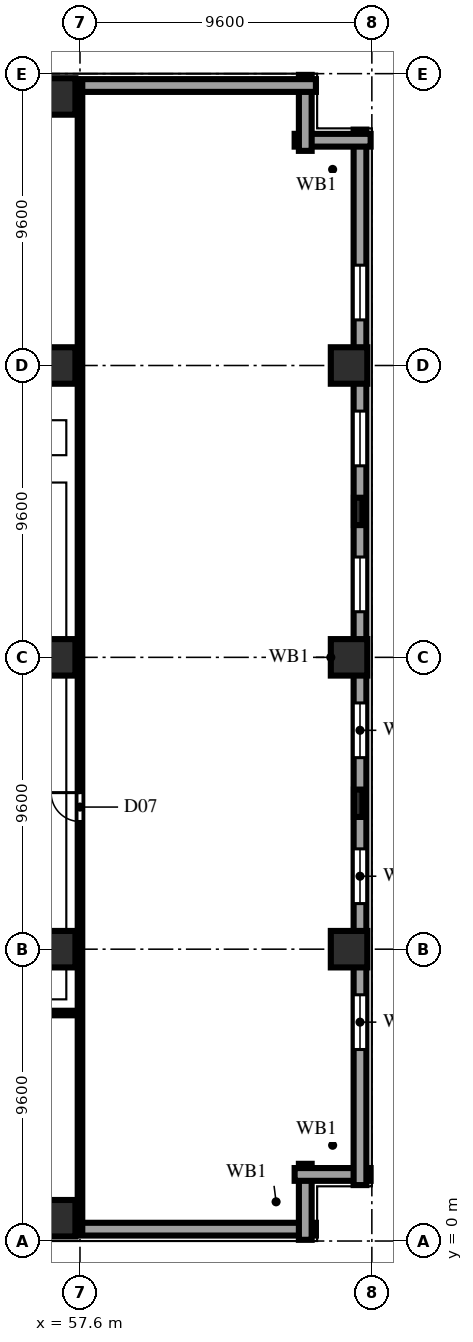
"""IFC4 building model, lengths in metres.
Left out: names, types, materials, properties, quantities, classifications, styles, units other than length and angle.
Written with IfcOpenShell. Run it as: python <this file> out.ifc"""

import sys

from ifc_helpers import new_model, si_unit, direction, frame, frame_2d, origin, origin_2d, place, context, subcontext, project, spatial, rectangle, extrude, element, fill, save


model = new_model("IFC4")
c1 = context("Model", 3, precision=1e-05, world=origin(), true_north=direction((0.0, 1.0)))
c2 = subcontext(c1, "Body", "Model", "MODEL_VIEW")
j1 = project(units=[si_unit("LENGTHUNIT", "METRE"), si_unit("PLANEANGLEUNIT", "RADIAN")], contexts=[c1])
p1 = place(None, origin())
s1 = spatial("IfcSite", under=j1, at=p1, CompositionType="ELEMENT")
p2 = place(p1, origin())
s2 = spatial("IfcBuilding", under=s1, at=p2, CompositionType="ELEMENT")
p3 = place(p2, frame((0.0, 0.0, 31.8)))
s3 = spatial("IfcBuildingStorey", under=s2, at=p3, CompositionType="ELEMENT", Elevation=31.8)
for number, where, z_axis, x_axis in (
    (1, (56.85, 0.75, 0.0), (0.0, 0.0, 1.0), (1.0, 0.0, 0.0)),
    (2, (56.85, 9.6, 0.0), (0.0, 0.0, 1.0), (1.0, 0.0, 0.0)),
    (3, (56.85, 19.2, 0.0), (0.0, 0.0, 1.0), (1.0, 0.0, 0.0)),
    (4, (56.85, 28.8, 0.0), (0.0, 0.0, 1.0), (1.0, 0.0, 0.0)),
    (5, (56.85, 37.65, 0.0), (0.0, 0.0, 1.0), (1.0, 0.0, 0.0)),
    (6, (66.45, 9.6, 0.0), (0.0, 0.0, 1.0), (1.0, 0.0, 0.0)),
    (7, (66.45, 19.2, 0.0), (0.0, 0.0, 1.0), (1.0, 0.0, 0.0)),
    (8, (66.45, 28.8, 0.0), (0.0, 0.0, 1.0), (1.0, 0.0, 0.0)),
):
    element("IfcColumn", number, at=place(p3, frame(where, z_axis=z_axis, x_axis=x_axis)), inside=s3, PredefinedType="COLUMN", context=c2, shape_type="SweptSolid", body=[
        extrude(rectangle(XDim=1.2, YDim=1.2, at=origin_2d()), origin(), (0.0, 0.0, 1.0), 3.8),
    ])
for number, where, z_axis, x_axis in (
    (9, (66.75, 14.4, 0.0), (0.0, 0.0, 1.0), (0.0, 1.0, 0.0)),
    (10, (66.75, 24.0, 0.0), (0.0, 0.0, 1.0), (0.0, 1.0, 0.0)),
):
    element("IfcColumn", number, at=place(p3, frame(where, z_axis=z_axis, x_axis=x_axis)), inside=s3, PredefinedType="PILASTER", context=c2, shape_type="SweptSolid", body=[
        extrude(rectangle(XDim=0.9, YDim=0.28, at=origin_2d()), origin(), (0.0, 0.0, 1.0), 3.8),
    ])
p4 = place(p3, frame((1.84, 0.39, 0.0), z_axis=(0.0, 0.0, 1.0), x_axis=(1.0, 0.0, 0.0)))
e11 = element("IfcWall", 11, at=p4, inside=s3, PredefinedType="SOLIDWALL", context=c2, shape_type="SweptSolid", body=[
    extrude(rectangle(XDim=63.52, YDim=0.42, at=frame_2d((31.76, 0.0))), origin(), (0.0, 0.0, 1.0), 3.54),
])
p5 = place(p4, frame((3.86, 0.0, 0.75)))
e12 = element("IfcOpeningElement", 12, at=p5, cuts=e11, PredefinedType="OPENING", context=c2, shape_type="SweptSolid", body=[
    extrude(rectangle(XDim=3.0, YDim=1.9, at=frame_2d((1.5, 0.95))), frame((0.0, 0.222, 0.0), z_axis=(0.0, -1.0, 0.0), x_axis=(1.0, 0.0, 0.0)), (0.0, 0.0, 1.0), 0.444),
])
p6 = place(p4, frame((8.66, 0.0, 0.75)))
e13 = element("IfcOpeningElement", 13, at=p6, cuts=e11, PredefinedType="OPENING", context=c2, shape_type="SweptSolid", body=[
    extrude(rectangle(XDim=3.0, YDim=1.9, at=frame_2d((1.5, 0.95))), frame((0.0, 0.222, 0.0), z_axis=(0.0, -1.0, 0.0), x_axis=(1.0, 0.0, 0.0)), (0.0, 0.0, 1.0), 0.444),
])
p7 = place(p4, frame((13.46, 0.0, 0.75)))
e14 = element("IfcOpeningElement", 14, at=p7, cuts=e11, PredefinedType="OPENING", context=c2, shape_type="SweptSolid", body=[
    extrude(rectangle(XDim=3.0, YDim=1.9, at=frame_2d((1.5, 0.95))), frame((0.0, 0.222, 0.0), z_axis=(0.0, -1.0, 0.0), x_axis=(1.0, 0.0, 0.0)), (0.0, 0.0, 1.0), 0.444),
])
p8 = place(p4, frame((18.26, 0.0, 0.75)))
e15 = element("IfcOpeningElement", 15, at=p8, cuts=e11, PredefinedType="OPENING", context=c2, shape_type="SweptSolid", body=[
    extrude(rectangle(XDim=3.0, YDim=1.9, at=frame_2d((1.5, 0.95))), frame((0.0, 0.222, 0.0), z_axis=(0.0, -1.0, 0.0), x_axis=(1.0, 0.0, 0.0)), (0.0, 0.0, 1.0), 0.444),
])
p9 = place(p4, frame((23.06, 0.0, 0.75)))
e16 = element("IfcOpeningElement", 16, at=p9, cuts=e11, PredefinedType="OPENING", context=c2, shape_type="SweptSolid", body=[
    extrude(rectangle(XDim=3.0, YDim=1.9, at=frame_2d((1.5, 0.95))), frame((0.0, 0.222, 0.0), z_axis=(0.0, -1.0, 0.0), x_axis=(1.0, 0.0, 0.0)), (0.0, 0.0, 1.0), 0.444),
])
for number, where, z_axis, x_axis in (
    (17, (65.01, 0.04, 0.0), (0.0, 0.0, 1.0), (0.0, 1.0, 0.0)),
    (18, (64.66, 2.19, 0.0), (0.0, 0.0, 1.0), (1.0, 0.0, 0.0)),
):
    element("IfcWall", number, at=place(p3, frame(where, z_axis=z_axis, x_axis=x_axis)), inside=s3, PredefinedType="SOLIDWALL", context=c2, shape_type="SweptSolid", body=[
        extrude(rectangle(XDim=2.5, YDim=0.42, at=frame_2d((1.25, 0.0))), origin(), (0.0, 0.0, 1.0), 3.54),
    ])
p10 = place(p3, frame((66.81, 1.84, 0.0), z_axis=(0.0, 0.0, 1.0), x_axis=(0.0, 1.0, 0.0)))
e19 = element("IfcWall", 19, at=p10, inside=s3, PredefinedType="SOLIDWALL", context=c2, shape_type="SweptSolid", body=[
    extrude(rectangle(XDim=34.72, YDim=0.42, at=frame_2d((17.36, 0.0))), origin(), (0.0, 0.0, 1.0), 3.54),
])
p11 = place(p10, frame((4.46, 0.0, 0.85)))
e20 = element("IfcOpeningElement", 20, at=p11, cuts=e19, PredefinedType="OPENING", context=c2, shape_type="SweptSolid", body=[
    extrude(rectangle(XDim=1.8, YDim=1.85, at=frame_2d((0.9, 0.925))), frame((0.0, 0.222, 0.0), z_axis=(0.0, -1.0, 0.0), x_axis=(1.0, 0.0, 0.0)), (0.0, 0.0, 1.0), 0.444),
])
p12 = place(p10, frame((9.26, 0.0, 0.85)))
e21 = element("IfcOpeningElement", 21, at=p12, cuts=e19, PredefinedType="OPENING", context=c2, shape_type="SweptSolid", body=[
    extrude(rectangle(XDim=1.8, YDim=1.85, at=frame_2d((0.9, 0.925))), frame((0.0, 0.222, 0.0), z_axis=(0.0, -1.0, 0.0), x_axis=(1.0, 0.0, 0.0)), (0.0, 0.0, 1.0), 0.444),
])
p13 = place(p10, frame((14.06, 0.0, 0.85)))
e22 = element("IfcOpeningElement", 22, at=p13, cuts=e19, PredefinedType="OPENING", context=c2, shape_type="SweptSolid", body=[
    extrude(rectangle(XDim=1.8, YDim=1.85, at=frame_2d((0.9, 0.925))), frame((0.0, 0.222, 0.0), z_axis=(0.0, -1.0, 0.0), x_axis=(1.0, 0.0, 0.0)), (0.0, 0.0, 1.0), 0.444),
])
p14 = place(p10, frame((18.86, 0.0, 0.85)))
e23 = element("IfcOpeningElement", 23, at=p14, cuts=e19, PredefinedType="OPENING", context=c2, shape_type="SweptSolid", body=[
    extrude(rectangle(XDim=1.8, YDim=1.85, at=frame_2d((0.9, 0.925))), frame((0.0, 0.222, 0.0), z_axis=(0.0, -1.0, 0.0), x_axis=(1.0, 0.0, 0.0)), (0.0, 0.0, 1.0), 0.444),
])
p15 = place(p10, frame((23.66, 0.0, 0.85)))
e24 = element("IfcOpeningElement", 24, at=p15, cuts=e19, PredefinedType="OPENING", context=c2, shape_type="SweptSolid", body=[
    extrude(rectangle(XDim=1.8, YDim=1.85, at=frame_2d((0.9, 0.925))), frame((0.0, 0.222, 0.0), z_axis=(0.0, -1.0, 0.0), x_axis=(1.0, 0.0, 0.0)), (0.0, 0.0, 1.0), 0.444),
])
p16 = place(p10, frame((28.46, 0.0, 0.85)))
e25 = element("IfcOpeningElement", 25, at=p16, cuts=e19, PredefinedType="OPENING", context=c2, shape_type="SweptSolid", body=[
    extrude(rectangle(XDim=1.8, YDim=1.85, at=frame_2d((0.9, 0.925))), frame((0.0, 0.222, 0.0), z_axis=(0.0, -1.0, 0.0), x_axis=(1.0, 0.0, 0.0)), (0.0, 0.0, 1.0), 0.444),
])
for number, where, z_axis, x_axis in (
    (26, (67.16, 36.21, 0.0), (0.0, 0.0, 1.0), (-1.0, 0.0, 0.0)),
    (27, (65.01, 35.86, 0.0), (0.0, 0.0, 1.0), (0.0, 1.0, 0.0)),
):
    element("IfcWall", number, at=place(p3, frame(where, z_axis=z_axis, x_axis=x_axis)), inside=s3, PredefinedType="SOLIDWALL", context=c2, shape_type="SweptSolid", body=[
        extrude(rectangle(XDim=2.5, YDim=0.42, at=frame_2d((1.25, 0.0))), origin(), (0.0, 0.0, 1.0), 3.54),
    ])
p17 = place(p3, frame((65.36, 38.01, 0.0), z_axis=(0.0, 0.0, 1.0), x_axis=(-1.0, 0.0, 0.0)))
e28 = element("IfcWall", 28, at=p17, inside=s3, PredefinedType="SOLIDWALL", context=c2, shape_type="SweptSolid", body=[
    extrude(rectangle(XDim=27.7, YDim=0.42, at=frame_2d((13.85, 0.0))), origin(), (0.0, 0.0, 1.0), 3.54),
])
p18 = place(p3, frame((0.22, 7.5, 0.0), z_axis=(0.0, 0.0, 1.0), x_axis=(1.0, 0.0, 0.0)))
e29 = element("IfcWall", 29, at=p18, inside=s3, PredefinedType="PARTITIONING", context=c2, shape_type="SweptSolid", body=[
    extrude(rectangle(XDim=57.38, YDim=0.15, at=frame_2d((28.69, 0.0))), origin(), (0.0, 0.0, 1.0), 3.54),
])
p19 = place(p18, frame((11.43, 0.0, 0.0)))
e30 = element("IfcOpeningElement", 30, at=p19, cuts=e29, PredefinedType="OPENING", context=c2, shape_type="SweptSolid", body=[
    extrude(rectangle(XDim=2.0, YDim=2.3, at=frame_2d((1.0, 1.15))), frame((0.0, 0.087, 0.0), z_axis=(0.0, -1.0, 0.0), x_axis=(1.0, 0.0, 0.0)), (0.0, 0.0, 1.0), 0.174),
])
p20 = place(p18, frame((14.73, 0.0, 0.0)))
e31 = element("IfcOpeningElement", 31, at=p20, cuts=e29, PredefinedType="OPENING", context=c2, shape_type="SweptSolid", body=[
    extrude(rectangle(XDim=1.2, YDim=2.2, at=frame_2d((0.6, 1.1))), frame((0.0, 0.087, 0.0), z_axis=(0.0, -1.0, 0.0), x_axis=(1.0, 0.0, 0.0)), (0.0, 0.0, 1.0), 0.174),
])
p21 = place(p18, frame((24.33, 0.0, 0.0)))
e32 = element("IfcOpeningElement", 32, at=p21, cuts=e29, PredefinedType="OPENING", context=c2, shape_type="SweptSolid", body=[
    extrude(rectangle(XDim=1.2, YDim=2.2, at=frame_2d((0.6, 1.1))), frame((0.0, 0.087, 0.0), z_axis=(0.0, -1.0, 0.0), x_axis=(1.0, 0.0, 0.0)), (0.0, 0.0, 1.0), 0.174),
])
p22 = place(p18, frame((41.68, 0.0, 0.0)))
e33 = element("IfcOpeningElement", 33, at=p22, cuts=e29, PredefinedType="OPENING", context=c2, shape_type="SweptSolid", body=[
    extrude(rectangle(XDim=1.2, YDim=2.2, at=frame_2d((0.6, 1.1))), frame((0.0, 0.087, 0.0), z_axis=(0.0, -1.0, 0.0), x_axis=(1.0, 0.0, 0.0)), (0.0, 0.0, 1.0), 0.174),
])
p23 = place(p18, frame((51.33, 0.0, 0.0)))
e34 = element("IfcOpeningElement", 34, at=p23, cuts=e29, PredefinedType="OPENING", context=c2, shape_type="SweptSolid", body=[
    extrude(rectangle(XDim=0.95, YDim=2.15, at=frame_2d((0.475, 1.075))), frame((0.0, 0.087, 0.0), z_axis=(0.0, -1.0, 0.0), x_axis=(1.0, 0.0, 0.0)), (0.0, 0.0, 1.0), 0.174),
])
p24 = place(p3, frame((57.6, 0.22, 0.0), z_axis=(0.0, 0.0, 1.0), x_axis=(0.0, 1.0, 0.0)))
e35 = element("IfcWall", 35, at=p24, inside=s3, PredefinedType="PARTITIONING", context=c2, shape_type="SweptSolid", body=[
    extrude(rectangle(XDim=37.96, YDim=0.15, at=frame_2d((18.98, 0.0))), origin(), (0.0, 0.0, 1.0), 3.54),
])
p25 = place(p24, frame((13.58, 0.0, 0.0)))
e36 = element("IfcOpeningElement", 36, at=p25, cuts=e35, PredefinedType="OPENING", context=c2, shape_type="SweptSolid", body=[
    extrude(rectangle(XDim=0.95, YDim=2.15, at=frame_2d((0.475, 1.075))), frame((0.0, 0.087, 0.0), z_axis=(0.0, -1.0, 0.0), x_axis=(1.0, 0.0, 0.0)), (0.0, 0.0, 1.0), 0.174),
])
p26 = place(p11, origin())
e37 = element("IfcWindow", 37, at=p26, inside=s3, PartitioningType="DOUBLE_PANEL_VERTICAL", PredefinedType="WINDOW", context=c2, shape_type="SweptSolid", body=[
    extrude(rectangle(XDim=1.8, YDim=1.85, at=frame_2d((0.9, 0.925))), frame((0.0, 0.11, 0.0), z_axis=(0.0, -1.0, 0.0), x_axis=(1.0, 0.0, 0.0)), (0.0, 0.0, 1.0), 0.06),
])
fill(e20, e37)
p27 = place(p12, origin())
e38 = element("IfcWindow", 38, at=p27, inside=s3, PartitioningType="DOUBLE_PANEL_VERTICAL", PredefinedType="WINDOW", context=c2, shape_type="SweptSolid", body=[
    extrude(rectangle(XDim=1.8, YDim=1.85, at=frame_2d((0.9, 0.925))), frame((0.0, 0.11, 0.0), z_axis=(0.0, -1.0, 0.0), x_axis=(1.0, 0.0, 0.0)), (0.0, 0.0, 1.0), 0.06),
])
fill(e21, e38)
p28 = place(p13, origin())
e39 = element("IfcWindow", 39, at=p28, inside=s3, PartitioningType="DOUBLE_PANEL_VERTICAL", PredefinedType="WINDOW", context=c2, shape_type="SweptSolid", body=[
    extrude(rectangle(XDim=1.8, YDim=1.85, at=frame_2d((0.9, 0.925))), frame((0.0, 0.11, 0.0), z_axis=(0.0, -1.0, 0.0), x_axis=(1.0, 0.0, 0.0)), (0.0, 0.0, 1.0), 0.06),
])
fill(e22, e39)
p29 = place(p14, origin())
e40 = element("IfcWindow", 40, at=p29, inside=s3, PartitioningType="DOUBLE_PANEL_VERTICAL", PredefinedType="WINDOW", context=c2, shape_type="SweptSolid", body=[
    extrude(rectangle(XDim=1.8, YDim=1.85, at=frame_2d((0.9, 0.925))), frame((0.0, 0.11, 0.0), z_axis=(0.0, -1.0, 0.0), x_axis=(1.0, 0.0, 0.0)), (0.0, 0.0, 1.0), 0.06),
])
fill(e23, e40)
p30 = place(p15, origin())
e41 = element("IfcWindow", 41, at=p30, inside=s3, PartitioningType="DOUBLE_PANEL_VERTICAL", PredefinedType="WINDOW", context=c2, shape_type="SweptSolid", body=[
    extrude(rectangle(XDim=1.8, YDim=1.85, at=frame_2d((0.9, 0.925))), frame((0.0, 0.11, 0.0), z_axis=(0.0, -1.0, 0.0), x_axis=(1.0, 0.0, 0.0)), (0.0, 0.0, 1.0), 0.06),
])
fill(e24, e41)
p31 = place(p16, origin())
e42 = element("IfcWindow", 42, at=p31, inside=s3, PartitioningType="DOUBLE_PANEL_VERTICAL", PredefinedType="WINDOW", context=c2, shape_type="SweptSolid", body=[
    extrude(rectangle(XDim=1.8, YDim=1.85, at=frame_2d((0.9, 0.925))), frame((0.0, 0.11, 0.0), z_axis=(0.0, -1.0, 0.0), x_axis=(1.0, 0.0, 0.0)), (0.0, 0.0, 1.0), 0.06),
])
fill(e25, e42)
p32 = place(p25, origin())
e43 = element("IfcDoor", 43, at=p32, inside=s3, OperationType="SINGLE_SWING_RIGHT", PredefinedType="DOOR", context=c2, shape_type="SweptSolid", body=[
    extrude(rectangle(XDim=0.95, YDim=2.15, at=frame_2d((0.475, 1.075))), frame((0.0, 0.025, 0.0), z_axis=(0.0, -1.0, 0.0), x_axis=(1.0, 0.0, 0.0)), (0.0, 0.0, 1.0), 0.05),
])
fill(e36, e43)
save(model, sys.argv[1])
